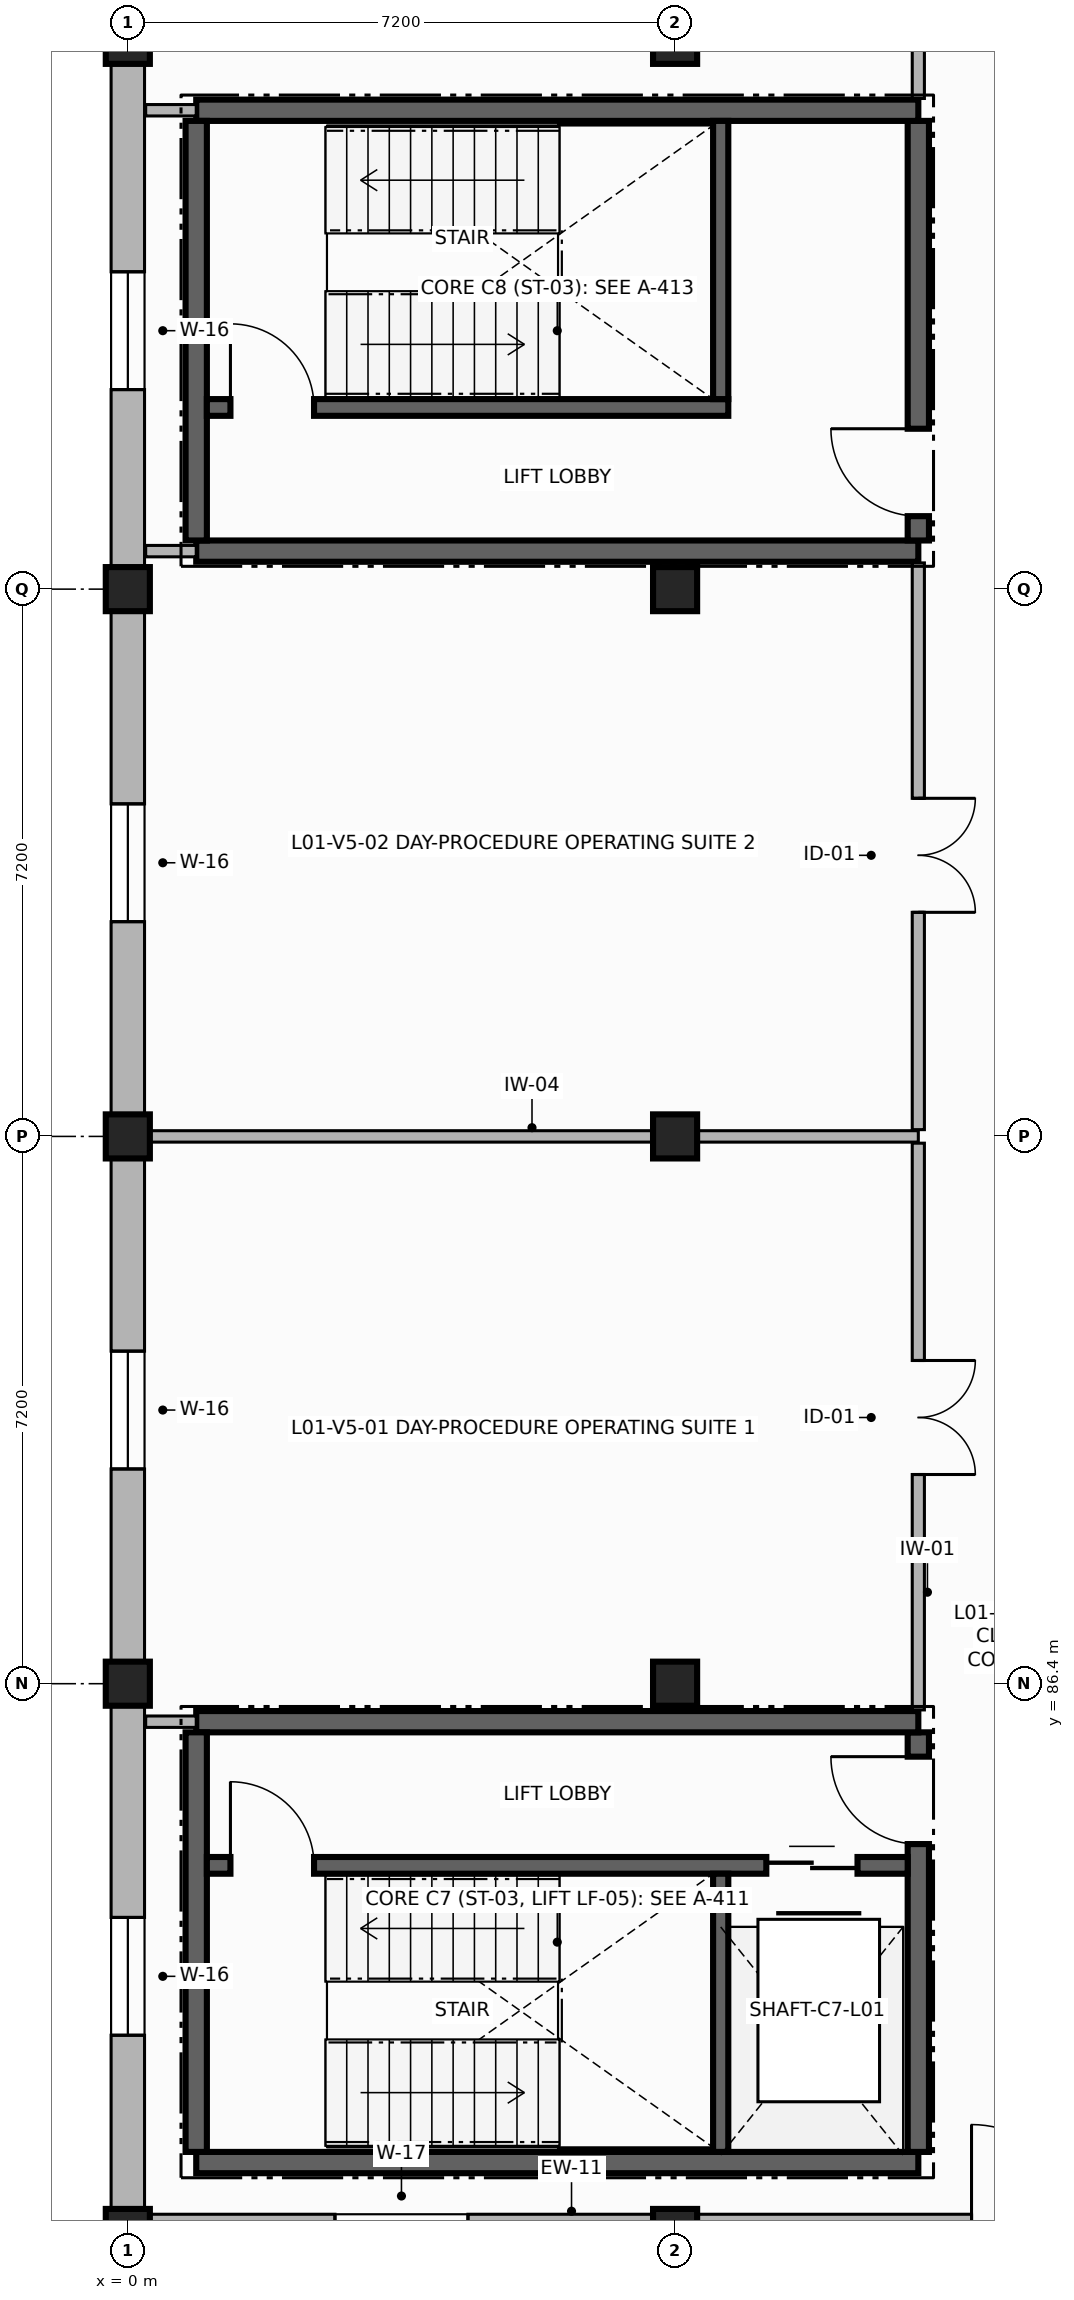
"""IFC4 building model, lengths in metres.
Left out: names, types, materials, properties, quantities, classifications, styles, units other than length and angle.
Written with IfcOpenShell. Run it as: python <this file> out.ifc"""

import sys

from ifc_helpers import new_model, si_unit, direction, frame, frame_2d, origin, origin_2d, place, context, subcontext, project, spatial, rectangle, extrude, element, fill, save


model = new_model("IFC4")
c1 = context("Model", 3, precision=1e-05, world=origin(), true_north=direction((0.0, 1.0)))
c2 = subcontext(c1, "Body", "Model", "MODEL_VIEW")
j1 = project(units=[si_unit("LENGTHUNIT", "METRE"), si_unit("PLANEANGLEUNIT", "RADIAN")], contexts=[c1])
p1 = place(None, origin())
s1 = spatial("IfcSite", under=j1, at=p1, CompositionType="ELEMENT")
p2 = place(p1, origin())
s2 = spatial("IfcBuilding", under=s1, at=p2, CompositionType="ELEMENT")
p3 = place(p2, frame((0.0, 0.0, 4.5)))
s3 = spatial("IfcBuildingStorey", under=s2, at=p3, CompositionType="ELEMENT", Elevation=4.5)
for number, where, z_axis, x_axis in (
    (1, (0.0, 79.2, 0.0), (0.0, 0.0, 1.0), (1.0, 0.0, 0.0)),
    (2, (0.0, 86.4, 0.0), (0.0, 0.0, 1.0), (1.0, 0.0, 0.0)),
    (3, (0.0, 93.6, 0.0), (0.0, 0.0, 1.0), (1.0, 0.0, 0.0)),
    (4, (0.0, 100.8, 0.0), (0.0, 0.0, 1.0), (1.0, 0.0, 0.0)),
    (5, (0.0, 108.0, 0.0), (0.0, 0.0, 1.0), (1.0, 0.0, 0.0)),
    (6, (7.2, 79.2, 0.0), (0.0, 0.0, 1.0), (1.0, 0.0, 0.0)),
    (7, (7.2, 86.4, 0.0), (0.0, 0.0, 1.0), (1.0, 0.0, 0.0)),
    (8, (7.2, 93.6, 0.0), (0.0, 0.0, 1.0), (1.0, 0.0, 0.0)),
    (9, (7.2, 100.8, 0.0), (0.0, 0.0, 1.0), (1.0, 0.0, 0.0)),
    (10, (7.2, 108.0, 0.0), (0.0, 0.0, 1.0), (1.0, 0.0, 0.0)),
):
    element("IfcColumn", number, at=place(p3, frame(where, z_axis=z_axis, x_axis=x_axis)), inside=s3, PredefinedType="COLUMN", context=c2, shape_type="SweptSolid", body=[
        extrude(rectangle(XDim=0.58, YDim=0.58, at=origin_2d()), origin(), (0.0, 0.0, 1.0), 3.59),
    ])
p4 = place(p3, frame((0.0, 79.2, 0.0), z_axis=(0.0, 0.0, 1.0), x_axis=(1.0, 0.0, 0.0)))
e11 = element("IfcWall", 11, at=p4, inside=s3, PredefinedType="SOLIDWALL", context=c2, shape_type="SweptSolid", body=[
    extrude(rectangle(XDim=7.2, YDim=0.44, at=frame_2d((3.6, 0.0))), origin(), (0.0, 0.0, 1.0), 2.92),
])
p5 = place(p4, frame((2.725, 0.0, 0.9)))
e12 = element("IfcOpeningElement", 12, at=p5, cuts=e11, PredefinedType="OPENING", context=c2, shape_type="SweptSolid", body=[
    extrude(rectangle(XDim=1.75, YDim=1.8, at=frame_2d((0.875, 0.9))), frame((0.0, 0.23, 0.0), z_axis=(0.0, -1.0, 0.0), x_axis=(1.0, 0.0, 0.0)), (0.0, 0.0, 1.0), 0.46),
])
p6 = place(p3, frame((7.2, 79.2, 0.0), z_axis=(0.0, 0.0, 1.0), x_axis=(1.0, 0.0, 0.0)))
e13 = element("IfcWall", 13, at=p6, inside=s3, PredefinedType="SOLIDWALL", context=c2, shape_type="SweptSolid", body=[
    extrude(rectangle(XDim=7.2, YDim=0.44, at=frame_2d((3.6, 0.0))), origin(), (0.0, 0.0, 1.0), 2.92),
])
p7 = place(p6, frame((3.9, 0.0, 0.0)))
e14 = element("IfcOpeningElement", 14, at=p7, cuts=e13, PredefinedType="OPENING", context=c2, shape_type="SweptSolid", body=[
    extrude(rectangle(XDim=1.4, YDim=2.25, at=frame_2d((0.7, 1.125))), frame((0.0, 0.23, 0.0), z_axis=(0.0, -1.0, 0.0), x_axis=(1.0, 0.0, 0.0)), (0.0, 0.0, 1.0), 0.46),
])
p8 = place(p3, frame((0.0, 108.0, 0.0), z_axis=(0.0, 0.0, 1.0), x_axis=(0.0, -1.0, 0.0)))
e15 = element("IfcWall", 15, at=p8, inside=s3, PredefinedType="SOLIDWALL", context=c2, shape_type="SweptSolid", body=[
    extrude(rectangle(XDim=7.2, YDim=0.44, at=frame_2d((3.6, 0.0))), origin(), (0.0, 0.0, 1.0), 2.92),
])
p9 = place(p8, frame((3.025, 0.0, 0.9)))
e16 = element("IfcOpeningElement", 16, at=p9, cuts=e15, PredefinedType="OPENING", context=c2, shape_type="SweptSolid", body=[
    extrude(rectangle(XDim=1.55, YDim=1.8, at=frame_2d((0.775, 0.9))), frame((0.0, 0.23, 0.0), z_axis=(0.0, -1.0, 0.0), x_axis=(1.0, 0.0, 0.0)), (0.0, 0.0, 1.0), 0.46),
])
p10 = place(p3, frame((0.0, 100.8, 0.0), z_axis=(0.0, 0.0, 1.0), x_axis=(0.0, -1.0, 0.0)))
e17 = element("IfcWall", 17, at=p10, inside=s3, PredefinedType="SOLIDWALL", context=c2, shape_type="SweptSolid", body=[
    extrude(rectangle(XDim=7.2, YDim=0.44, at=frame_2d((3.6, 0.0))), origin(), (0.0, 0.0, 1.0), 2.92),
])
p11 = place(p10, frame((2.825, 0.0, 0.9)))
e18 = element("IfcOpeningElement", 18, at=p11, cuts=e17, PredefinedType="OPENING", context=c2, shape_type="SweptSolid", body=[
    extrude(rectangle(XDim=1.55, YDim=1.8, at=frame_2d((0.775, 0.9))), frame((0.0, 0.23, 0.0), z_axis=(0.0, -1.0, 0.0), x_axis=(1.0, 0.0, 0.0)), (0.0, 0.0, 1.0), 0.46),
])
p12 = place(p3, frame((0.0, 93.6, 0.0), z_axis=(0.0, 0.0, 1.0), x_axis=(0.0, -1.0, 0.0)))
e19 = element("IfcWall", 19, at=p12, inside=s3, PredefinedType="SOLIDWALL", context=c2, shape_type="SweptSolid", body=[
    extrude(rectangle(XDim=7.2, YDim=0.44, at=frame_2d((3.6, 0.0))), origin(), (0.0, 0.0, 1.0), 2.92),
])
p13 = place(p12, frame((2.825, 0.0, 0.9)))
e20 = element("IfcOpeningElement", 20, at=p13, cuts=e19, PredefinedType="OPENING", context=c2, shape_type="SweptSolid", body=[
    extrude(rectangle(XDim=1.55, YDim=1.8, at=frame_2d((0.775, 0.9))), frame((0.0, 0.23, 0.0), z_axis=(0.0, -1.0, 0.0), x_axis=(1.0, 0.0, 0.0)), (0.0, 0.0, 1.0), 0.46),
])
p14 = place(p3, frame((0.0, 86.4, 0.0), z_axis=(0.0, 0.0, 1.0), x_axis=(0.0, -1.0, 0.0)))
e21 = element("IfcWall", 21, at=p14, inside=s3, PredefinedType="SOLIDWALL", context=c2, shape_type="SweptSolid", body=[
    extrude(rectangle(XDim=7.2, YDim=0.44, at=frame_2d((3.6, 0.0))), origin(), (0.0, 0.0, 1.0), 2.92),
])
p15 = place(p14, frame((3.075, 0.0, 0.9)))
e22 = element("IfcOpeningElement", 22, at=p15, cuts=e21, PredefinedType="OPENING", context=c2, shape_type="SweptSolid", body=[
    extrude(rectangle(XDim=1.55, YDim=1.8, at=frame_2d((0.775, 0.9))), frame((0.0, 0.23, 0.0), z_axis=(0.0, -1.0, 0.0), x_axis=(1.0, 0.0, 0.0)), (0.0, 0.0, 1.0), 0.46),
])
p16 = place(p3, frame((0.9, 80.1, 0.0), z_axis=(0.0, 0.0, 1.0), x_axis=(1.0, 0.0, 0.0)))
e23 = element("IfcWall", 23, at=p16, inside=s3, PredefinedType="SHEAR", context=c2, shape_type="SweptSolid", body=[
    extrude(rectangle(XDim=9.5, YDim=0.28, at=frame_2d((4.75, 0.0))), origin(), (0.0, 0.0, 1.0), 3.59),
])
p17 = place(p3, frame((10.4, 80.24, 0.0), z_axis=(0.0, 0.0, 1.0), x_axis=(0.0, 1.0, 0.0)))
e24 = element("IfcWall", 24, at=p17, inside=s3, PredefinedType="SHEAR", context=c2, shape_type="SweptSolid", body=[
    extrude(rectangle(XDim=5.52, YDim=0.28, at=frame_2d((2.76, 0.0))), origin(), (0.0, 0.0, 1.0), 3.59),
])
p18 = place(p17, frame((4.05, 0.0, 0.0)))
e25 = element("IfcOpeningElement", 25, at=p18, cuts=e24, PredefinedType="OPENING", context=c2, shape_type="SweptSolid", body=[
    extrude(rectangle(XDim=1.15, YDim=2.2, at=frame_2d((0.575, 1.1))), frame((0.0, 0.15, 0.0), z_axis=(0.0, -1.0, 0.0), x_axis=(1.0, 0.0, 0.0)), (0.0, 0.0, 1.0), 0.3),
])
p19 = place(p3, frame((10.4, 85.9, 0.0), z_axis=(0.0, 0.0, 1.0), x_axis=(-1.0, 0.0, 0.0)))
e26 = element("IfcWall", 26, at=p19, inside=s3, PredefinedType="SHEAR", context=c2, shape_type="SweptSolid", body=[
    extrude(rectangle(XDim=9.5, YDim=0.28, at=frame_2d((4.75, 0.0))), origin(), (0.0, 0.0, 1.0), 3.59),
])
p20 = place(p3, frame((0.9, 85.76, 0.0), z_axis=(0.0, 0.0, 1.0), x_axis=(0.0, -1.0, 0.0)))
e27 = element("IfcWall", 27, at=p20, inside=s3, PredefinedType="SHEAR", context=c2, shape_type="SweptSolid", body=[
    extrude(rectangle(XDim=5.52, YDim=0.28, at=frame_2d((2.76, 0.0))), origin(), (0.0, 0.0, 1.0), 3.59),
])
p21 = place(p3, frame((1.04, 84.01, 0.0), z_axis=(0.0, 0.0, 1.0), x_axis=(1.0, 0.0, 0.0)))
e28 = element("IfcWall", 28, at=p21, inside=s3, PredefinedType="SHEAR", context=c2, shape_type="SweptSolid", body=[
    extrude(rectangle(XDim=9.22, YDim=0.22, at=frame_2d((4.61, 0.0))), origin(), (0.0, 0.0, 1.0), 3.59),
])
p22 = place(p21, frame((0.31, 0.0, 0.0)))
e29 = element("IfcOpeningElement", 29, at=p22, cuts=e28, PredefinedType="OPENING", context=c2, shape_type="SweptSolid", body=[
    extrude(rectangle(XDim=1.1, YDim=2.15, at=frame_2d((0.55, 1.075))), frame((0.0, 0.12, 0.0), z_axis=(0.0, -1.0, 0.0), x_axis=(1.0, 0.0, 0.0)), (0.0, 0.0, 1.0), 0.24),
])
p23 = place(p21, frame((7.36, 0.0, 0.0)))
e30 = element("IfcOpeningElement", 30, at=p23, cuts=e28, PredefinedType="OPENING", context=c2, shape_type="SweptSolid", body=[
    extrude(rectangle(XDim=1.2, YDim=2.2, at=frame_2d((0.6, 1.1))), frame((0.0, 0.12, 0.0), z_axis=(0.0, -1.0, 0.0), x_axis=(1.0, 0.0, 0.0)), (0.0, 0.0, 1.0), 0.24),
])
p24 = place(p3, frame((7.8, 80.24, 0.0), z_axis=(0.0, 0.0, 1.0), x_axis=(0.0, 1.0, 0.0)))
e31 = element("IfcWall", 31, at=p24, inside=s3, PredefinedType="SHEAR", context=c2, shape_type="SweptSolid", body=[
    extrude(rectangle(XDim=3.66, YDim=0.2, at=frame_2d((1.83, 0.0))), origin(), (0.0, 0.0, 1.0), 3.59),
])
p25 = place(p3, frame((0.9, 101.3, 0.0), z_axis=(0.0, 0.0, 1.0), x_axis=(1.0, 0.0, 0.0)))
e32 = element("IfcWall", 32, at=p25, inside=s3, PredefinedType="SHEAR", context=c2, shape_type="SweptSolid", body=[
    extrude(rectangle(XDim=9.5, YDim=0.28, at=frame_2d((4.75, 0.0))), origin(), (0.0, 0.0, 1.0), 3.59),
])
p26 = place(p3, frame((10.4, 101.44, 0.0), z_axis=(0.0, 0.0, 1.0), x_axis=(0.0, 1.0, 0.0)))
e33 = element("IfcWall", 33, at=p26, inside=s3, PredefinedType="SHEAR", context=c2, shape_type="SweptSolid", body=[
    extrude(rectangle(XDim=5.52, YDim=0.28, at=frame_2d((2.76, 0.0))), origin(), (0.0, 0.0, 1.0), 3.59),
])
p27 = place(p26, frame((0.32, 0.0, 0.0)))
e34 = element("IfcOpeningElement", 34, at=p27, cuts=e33, PredefinedType="OPENING", context=c2, shape_type="SweptSolid", body=[
    extrude(rectangle(XDim=1.15, YDim=2.2, at=frame_2d((0.575, 1.1))), frame((0.0, 0.15, 0.0), z_axis=(0.0, -1.0, 0.0), x_axis=(1.0, 0.0, 0.0)), (0.0, 0.0, 1.0), 0.3),
])
p28 = place(p3, frame((10.4, 107.1, 0.0), z_axis=(0.0, 0.0, 1.0), x_axis=(-1.0, 0.0, 0.0)))
e35 = element("IfcWall", 35, at=p28, inside=s3, PredefinedType="SHEAR", context=c2, shape_type="SweptSolid", body=[
    extrude(rectangle(XDim=9.5, YDim=0.28, at=frame_2d((4.75, 0.0))), origin(), (0.0, 0.0, 1.0), 3.59),
])
p29 = place(p3, frame((0.9, 106.96, 0.0), z_axis=(0.0, 0.0, 1.0), x_axis=(0.0, -1.0, 0.0)))
e36 = element("IfcWall", 36, at=p29, inside=s3, PredefinedType="SHEAR", context=c2, shape_type="SweptSolid", body=[
    extrude(rectangle(XDim=5.52, YDim=0.28, at=frame_2d((2.76, 0.0))), origin(), (0.0, 0.0, 1.0), 3.59),
])
p30 = place(p3, frame((1.04, 103.19, 0.0), z_axis=(0.0, 0.0, 1.0), x_axis=(1.0, 0.0, 0.0)))
e37 = element("IfcWall", 37, at=p30, inside=s3, PredefinedType="SHEAR", context=c2, shape_type="SweptSolid", body=[
    extrude(rectangle(XDim=6.86, YDim=0.22, at=frame_2d((3.43, 0.0))), origin(), (0.0, 0.0, 1.0), 3.59),
])
p31 = place(p30, frame((0.31, 0.0, 0.0)))
e38 = element("IfcOpeningElement", 38, at=p31, cuts=e37, PredefinedType="OPENING", context=c2, shape_type="SweptSolid", body=[
    extrude(rectangle(XDim=1.1, YDim=2.15, at=frame_2d((0.55, 1.075))), frame((0.0, 0.12, 0.0), z_axis=(0.0, -1.0, 0.0), x_axis=(1.0, 0.0, 0.0)), (0.0, 0.0, 1.0), 0.24),
])
p32 = place(p3, frame((7.8, 103.3, 0.0), z_axis=(0.0, 0.0, 1.0), x_axis=(0.0, 1.0, 0.0)))
e39 = element("IfcWall", 39, at=p32, inside=s3, PredefinedType="SHEAR", context=c2, shape_type="SweptSolid", body=[
    extrude(rectangle(XDim=3.66, YDim=0.2, at=frame_2d((1.83, 0.0))), origin(), (0.0, 0.0, 1.0), 3.59),
])
p33 = place(p3, frame((0.235, 93.6, 0.0), z_axis=(0.0, 0.0, 1.0), x_axis=(1.0, 0.0, 0.0)))
e40 = element("IfcWall", 40, at=p33, inside=s3, PredefinedType="PARTITIONING", context=c2, shape_type="SweptSolid", body=[
    extrude(rectangle(XDim=10.165, YDim=0.15, at=frame_2d((5.083, 0.0))), origin(), (0.0, 0.0, 1.0), 2.9),
])
p34 = place(p3, frame((10.4, 93.511, 0.0), z_axis=(0.0, 0.0, 1.0), x_axis=(0.0, -1.0, 0.0)))
e41 = element("IfcWall", 41, at=p34, inside=s3, PredefinedType="PARTITIONING", context=c2, shape_type="SweptSolid", body=[
    extrude(rectangle(XDim=7.456, YDim=0.16, at=frame_2d((3.728, 0.0))), origin(), (0.0, 0.0, 1.0), 2.9),
])
p35 = place(p34, frame((2.859, 0.0, 0.0)))
e42 = element("IfcOpeningElement", 42, at=p35, cuts=e41, PredefinedType="OPENING", context=c2, shape_type="SweptSolid", body=[
    extrude(rectangle(XDim=1.5, YDim=2.3, at=frame_2d((0.75, 1.15))), frame((0.0, 0.09, 0.0), z_axis=(0.0, -1.0, 0.0), x_axis=(1.0, 0.0, 0.0)), (0.0, 0.0, 1.0), 0.18),
])
for number, where, z_axis, x_axis in (
    (43, (0.9, 85.9, 0.0), (0.0, 0.0, 1.0), (-1.0, 0.0, 0.0)),
    (44, (0.235, 101.3, 0.0), (0.0, 0.0, 1.0), (1.0, 0.0, 0.0)),
):
    element("IfcWall", number, at=place(p3, frame(where, z_axis=z_axis, x_axis=x_axis)), inside=s3, PredefinedType="PARTITIONING", context=c2, shape_type="SweptSolid", body=[
        extrude(rectangle(XDim=0.665, YDim=0.15, at=frame_2d((0.333, 0.0))), origin(), (0.0, 0.0, 1.0), 2.9),
    ])
p36 = place(p3, frame((10.4, 101.145, 0.0), z_axis=(0.0, 0.0, 1.0), x_axis=(0.0, -1.0, 0.0)))
e45 = element("IfcWall", 45, at=p36, inside=s3, PredefinedType="PARTITIONING", context=c2, shape_type="SweptSolid", body=[
    extrude(rectangle(XDim=7.456, YDim=0.16, at=frame_2d((3.728, 0.0))), origin(), (0.0, 0.0, 1.0), 2.9),
])
p37 = place(p36, frame((3.097, 0.0, 0.0)))
e46 = element("IfcOpeningElement", 46, at=p37, cuts=e45, PredefinedType="OPENING", context=c2, shape_type="SweptSolid", body=[
    extrude(rectangle(XDim=1.5, YDim=2.3, at=frame_2d((0.75, 1.15))), frame((0.0, 0.09, 0.0), z_axis=(0.0, -1.0, 0.0), x_axis=(1.0, 0.0, 0.0)), (0.0, 0.0, 1.0), 0.18),
])
p38 = place(p3, frame((10.4, 112.565, 0.0), z_axis=(0.0, 0.0, 1.0), x_axis=(0.0, -1.0, 0.0)))
e47 = element("IfcWall", 47, at=p38, inside=s3, PredefinedType="PARTITIONING", context=c2, shape_type="SweptSolid", body=[
    extrude(rectangle(XDim=5.31, YDim=0.16, at=frame_2d((2.655, 0.0))), origin(), (0.0, 0.0, 1.0), 2.9),
])
p39 = place(p38, frame((1.357, 0.0, 0.0)))
e48 = element("IfcOpeningElement", 48, at=p39, cuts=e47, PredefinedType="OPENING", context=c2, shape_type="SweptSolid", body=[
    extrude(rectangle(XDim=1.5, YDim=2.3, at=frame_2d((0.75, 1.15))), frame((0.0, 0.09, 0.0), z_axis=(0.0, -1.0, 0.0), x_axis=(1.0, 0.0, 0.0)), (0.0, 0.0, 1.0), 0.18),
])
p40 = place(p3, frame((0.9, 107.1, 0.0), z_axis=(0.0, 0.0, 1.0), x_axis=(-1.0, 0.0, 0.0)))
e49 = element("IfcWall", 49, at=p40, inside=s3, PredefinedType="PARTITIONING", context=c2, shape_type="SweptSolid", body=[
    extrude(rectangle(XDim=0.665, YDim=0.15, at=frame_2d((0.333, 0.0))), origin(), (0.0, 0.0, 1.0), 2.9),
])
p41 = place(p9, origin())
e50 = element("IfcWindow", 50, at=p41, inside=s3, PartitioningType="SINGLE_PANEL", PredefinedType="WINDOW", context=c2, shape_type="SweptSolid", body=[
    extrude(rectangle(XDim=1.55, YDim=1.8, at=frame_2d((0.775, 0.9))), frame((0.0, 0.03, 0.0), z_axis=(0.0, -1.0, 0.0), x_axis=(1.0, 0.0, 0.0)), (0.0, 0.0, 1.0), 0.06),
])
fill(e16, e50)
p42 = place(p11, origin())
e51 = element("IfcWindow", 51, at=p42, inside=s3, PartitioningType="SINGLE_PANEL", PredefinedType="WINDOW", context=c2, shape_type="SweptSolid", body=[
    extrude(rectangle(XDim=1.55, YDim=1.8, at=frame_2d((0.775, 0.9))), frame((0.0, 0.03, 0.0), z_axis=(0.0, -1.0, 0.0), x_axis=(1.0, 0.0, 0.0)), (0.0, 0.0, 1.0), 0.06),
])
fill(e18, e51)
p43 = place(p13, origin())
e52 = element("IfcWindow", 52, at=p43, inside=s3, PartitioningType="SINGLE_PANEL", PredefinedType="WINDOW", context=c2, shape_type="SweptSolid", body=[
    extrude(rectangle(XDim=1.55, YDim=1.8, at=frame_2d((0.775, 0.9))), frame((0.0, 0.03, 0.0), z_axis=(0.0, -1.0, 0.0), x_axis=(1.0, 0.0, 0.0)), (0.0, 0.0, 1.0), 0.06),
])
fill(e20, e52)
p44 = place(p15, origin())
e53 = element("IfcWindow", 53, at=p44, inside=s3, PartitioningType="SINGLE_PANEL", PredefinedType="WINDOW", context=c2, shape_type="SweptSolid", body=[
    extrude(rectangle(XDim=1.55, YDim=1.8, at=frame_2d((0.775, 0.9))), frame((0.0, 0.03, 0.0), z_axis=(0.0, -1.0, 0.0), x_axis=(1.0, 0.0, 0.0)), (0.0, 0.0, 1.0), 0.06),
])
fill(e22, e53)
p45 = place(p22, origin())
e54 = element("IfcDoor", 54, at=p45, inside=s3, OperationType="SINGLE_SWING_LEFT", PredefinedType="DOOR", context=c2, shape_type="SweptSolid", body=[
    extrude(rectangle(XDim=1.1, YDim=2.15, at=frame_2d((0.55, 1.075))), frame((0.0, 0.025, 0.0), z_axis=(0.0, -1.0, 0.0), x_axis=(1.0, 0.0, 0.0)), (0.0, 0.0, 1.0), 0.05),
])
fill(e29, e54)
p46 = place(p23, origin())
e55 = element("IfcDoor", 55, at=p46, inside=s3, OperationType="DOUBLE_DOOR_SLIDING", PredefinedType="DOOR", context=c2, shape_type="SweptSolid", body=[
    extrude(rectangle(XDim=1.2, YDim=2.2, at=frame_2d((0.6, 1.1))), frame((0.0, 0.025, 0.0), z_axis=(0.0, -1.0, 0.0), x_axis=(1.0, 0.0, 0.0)), (0.0, 0.0, 1.0), 0.05),
])
fill(e30, e55)
p47 = place(p18, origin())
e56 = element("IfcDoor", 56, at=p47, inside=s3, OperationType="SINGLE_SWING_RIGHT", PredefinedType="DOOR", context=c2, shape_type="SweptSolid", body=[
    extrude(rectangle(XDim=1.15, YDim=2.2, at=frame_2d((0.575, 1.1))), frame((0.0, 0.025, 0.0), z_axis=(0.0, -1.0, 0.0), x_axis=(1.0, 0.0, 0.0)), (0.0, 0.0, 1.0), 0.05),
])
fill(e25, e56)
p48 = place(p31, origin())
e57 = element("IfcDoor", 57, at=p48, inside=s3, OperationType="SINGLE_SWING_LEFT", PredefinedType="DOOR", context=c2, shape_type="SweptSolid", body=[
    extrude(rectangle(XDim=1.1, YDim=2.15, at=frame_2d((0.55, 1.075))), frame((0.0, 0.025, 0.0), z_axis=(0.0, -1.0, 0.0), x_axis=(1.0, 0.0, 0.0)), (0.0, 0.0, 1.0), 0.05),
])
fill(e38, e57)
p49 = place(p27, origin())
e58 = element("IfcDoor", 58, at=p49, inside=s3, OperationType="SINGLE_SWING_RIGHT", PredefinedType="DOOR", context=c2, shape_type="SweptSolid", body=[
    extrude(rectangle(XDim=1.15, YDim=2.2, at=frame_2d((0.575, 1.1))), frame((0.0, 0.025, 0.0), z_axis=(0.0, -1.0, 0.0), x_axis=(1.0, 0.0, 0.0)), (0.0, 0.0, 1.0), 0.05),
])
fill(e34, e58)
p50 = place(p35, origin())
e59 = element("IfcDoor", 59, at=p50, inside=s3, OperationType="DOUBLE_DOOR_SINGLE_SWING", PredefinedType="DOOR", context=c2, shape_type="SweptSolid", body=[
    extrude(rectangle(XDim=1.5, YDim=2.3, at=frame_2d((0.75, 1.15))), frame((0.0, 0.025, 0.0), z_axis=(0.0, -1.0, 0.0), x_axis=(1.0, 0.0, 0.0)), (0.0, 0.0, 1.0), 0.05),
])
fill(e42, e59)
p51 = place(p37, origin())
e60 = element("IfcDoor", 60, at=p51, inside=s3, OperationType="DOUBLE_DOOR_SINGLE_SWING", PredefinedType="DOOR", context=c2, shape_type="SweptSolid", body=[
    extrude(rectangle(XDim=1.5, YDim=2.3, at=frame_2d((0.75, 1.15))), frame((0.0, 0.025, 0.0), z_axis=(0.0, -1.0, 0.0), x_axis=(1.0, 0.0, 0.0)), (0.0, 0.0, 1.0), 0.05),
])
fill(e46, e60)
save(model, sys.argv[1])
